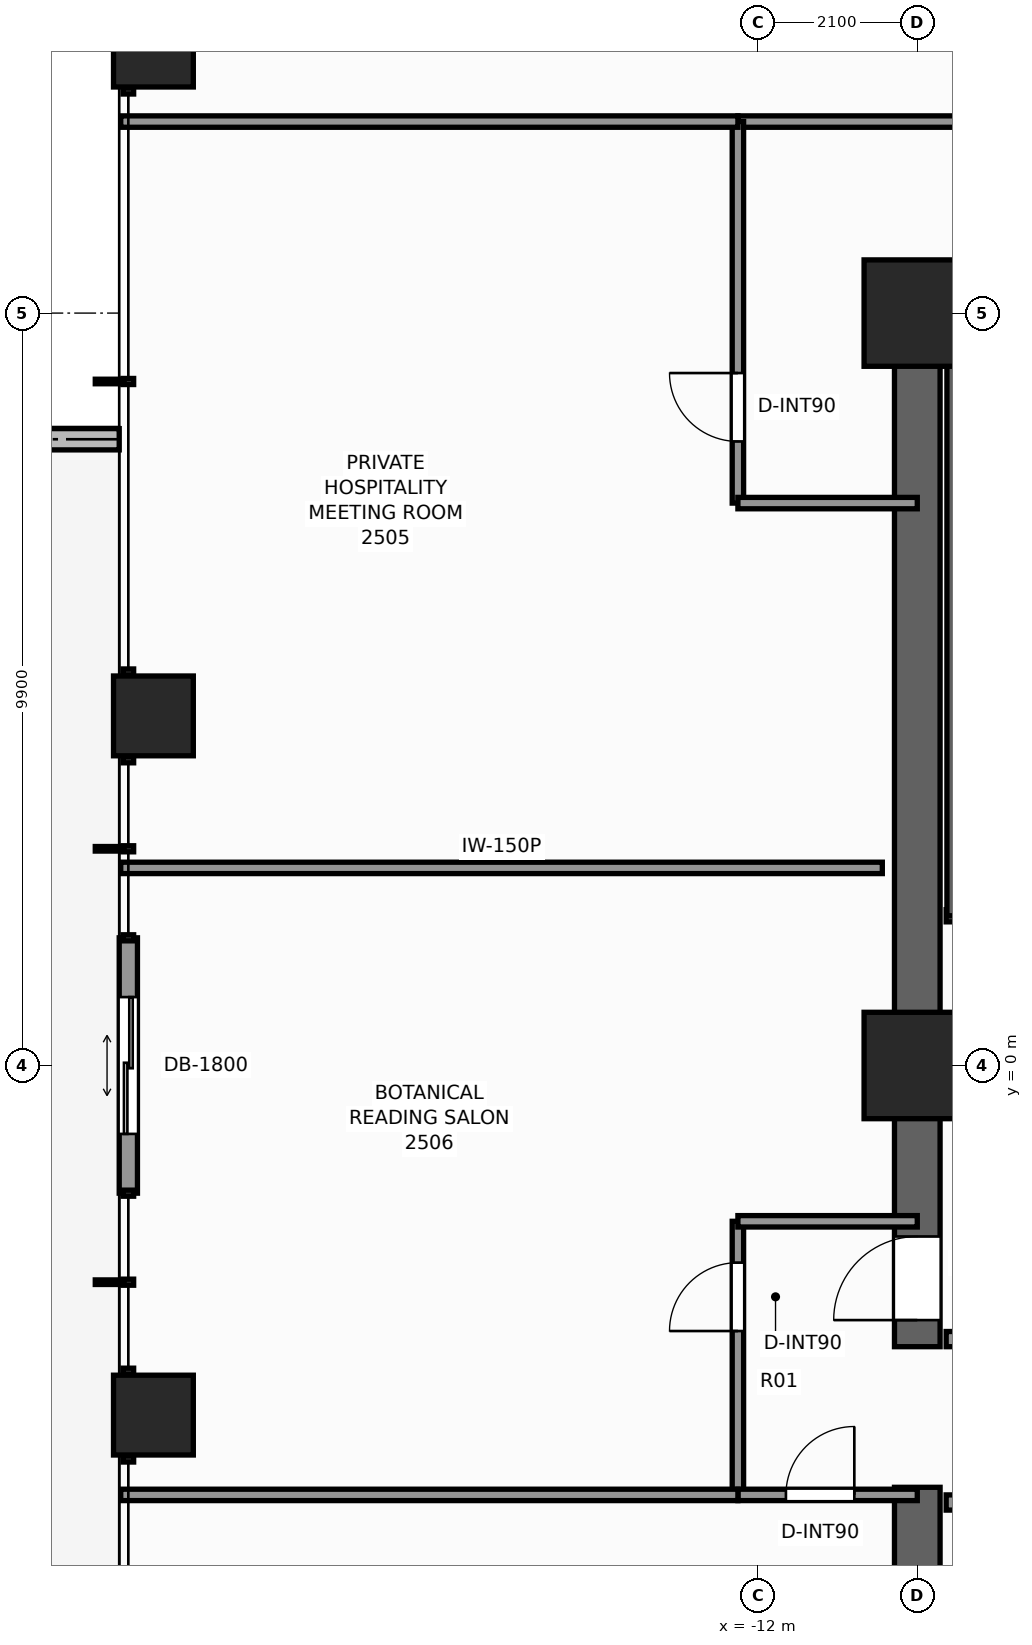
"""IFC4 building model, lengths in metres.
Left out: names, types, materials, properties, quantities, classifications, styles, units other than length and angle.
Written with IfcOpenShell. Run it as: python <this file> out.ifc"""

import sys

from ifc_helpers import new_model, si_unit, direction, frame, frame_2d, origin, origin_2d, place, context, subcontext, project, spatial, rectangle, extrude, element, fill, save


model = new_model("IFC4")
c1 = context("Model", 3, precision=1e-05, world=origin(), true_north=direction((0.0, 1.0)))
c2 = subcontext(c1, "Body", "Model", "MODEL_VIEW")
j1 = project(units=[si_unit("LENGTHUNIT", "METRE"), si_unit("PLANEANGLEUNIT", "RADIAN")], contexts=[c1])
p1 = place(None, origin())
s1 = spatial("IfcSite", under=j1, at=p1, CompositionType="ELEMENT")
p2 = place(p1, origin())
s2 = spatial("IfcBuilding", under=s1, at=p2, CompositionType="ELEMENT")
p3 = place(p2, frame((0.0, 0.0, 88.7)))
s3 = spatial("IfcBuildingStorey", under=s2, at=p3, CompositionType="ELEMENT", Elevation=88.7)
p4 = place(p3, frame((-10.2, 9.9, 0.0), z_axis=(0.0, 0.0, 1.0), x_axis=(1.0, 0.0, 0.0)))
e1 = element("IfcWall", 1, at=p4, inside=s3, PredefinedType="SHEAR", context=c2, shape_type="SweptSolid", body=[
    extrude(rectangle(XDim=14.62, YDim=0.6, at=frame_2d((7.31, 0.0))), origin(), (0.0, 0.0, 1.0), 3.3),
])
p5 = place(p3, frame((-9.9, -9.6, 0.0), z_axis=(0.0, 0.0, 1.0), x_axis=(0.0, 1.0, 0.0)))
e2 = element("IfcWall", 2, at=p5, inside=s3, PredefinedType="SHEAR", context=c2, shape_type="SweptSolid", body=[
    extrude(rectangle(XDim=4.05, YDim=0.6, at=frame_2d((2.025, 0.0))), origin(), (0.0, 0.0, 1.0), 3.3),
])
p6 = place(p3, frame((-9.9, -3.7, 0.0), z_axis=(0.0, 0.0, 1.0), x_axis=(0.0, 1.0, 0.0)))
e3 = element("IfcWall", 3, at=p6, inside=s3, PredefinedType="SHEAR", context=c2, shape_type="SweptSolid", body=[
    extrude(rectangle(XDim=13.3, YDim=0.6, at=frame_2d((6.65, 0.0))), origin(), (0.0, 0.0, 1.0), 3.3),
])
p7 = place(p6, frame((0.35, 0.0, 0.0)))
e4 = element("IfcOpeningElement", 4, at=p7, cuts=e3, PredefinedType="OPENING", context=c2, shape_type="SweptSolid", body=[
    extrude(rectangle(XDim=1.1, YDim=2.2, at=frame_2d((0.55, 1.1))), frame((0.0, 0.31, 0.0), z_axis=(0.0, -1.0, 0.0), x_axis=(1.0, 0.0, 0.0)), (0.0, 0.0, 1.0), 0.62),
])
for number, where, z_axis, x_axis in (
    (5, (-9.9, 9.9, 0.0), (0.0, 0.0, 1.0), (1.0, 0.0, 0.0)),
    (6, (-9.9, 0.0, 0.0), (0.0, 0.0, 1.0), (1.0, 0.0, 0.0)),
):
    element("IfcColumn", number, at=place(p3, frame(where, z_axis=z_axis, x_axis=x_axis)), inside=s3, PredefinedType="COLUMN", context=c2, shape_type="SweptSolid", body=[
        extrude(rectangle(XDim=1.4, YDim=1.4, at=origin_2d()), origin(), (0.0, 0.0, 1.0), 3.3),
    ])
for number, where, z_axis, x_axis in (
    (7, (-19.95, -4.6, 0.0), (0.0, 0.0, 1.0), (1.0, 0.0, 0.0)),
    (8, (-19.95, 4.6, 0.0), (0.0, 0.0, 1.0), (1.0, 0.0, 0.0)),
    (9, (-19.95, 13.4, 0.0), (0.0, 0.0, 1.0), (1.0, 0.0, 0.0)),
):
    element("IfcColumn", number, at=place(p3, frame(where, z_axis=z_axis, x_axis=x_axis)), inside=s3, PredefinedType="COLUMN", context=c2, shape_type="SweptSolid", body=[
        extrude(rectangle(XDim=1.05, YDim=1.05, at=origin_2d()), origin(), (0.0, 0.0, 1.0), 3.3),
    ])
p8 = place(p3, frame((-20.4, 8.24, -0.04), z_axis=(0.0, 0.0, 1.0), x_axis=(-1.0, 0.0, 0.0)))
e10 = element("IfcWall", 10, at=p8, inside=s3, PredefinedType="PARAPET", context=c2, shape_type="SweptSolid", body=[
    extrude(rectangle(XDim=2.006, YDim=0.28, at=frame_2d((1.003, 0.0))), origin(), (0.0, 0.0, 1.0), 0.42),
])
p9 = place(p3, frame((-20.28, -1.68, 0.0), z_axis=(0.0, 0.0, 1.0), x_axis=(0.0, 1.0, 0.0)))
e11 = element("IfcWall", 11, at=p9, inside=s3, PredefinedType="STANDARD", context=c2, shape_type="SweptSolid", body=[
    extrude(rectangle(XDim=3.36, YDim=0.24, at=frame_2d((1.68, 0.0))), origin(), (0.0, 0.0, 1.0), 3.08),
])
p10 = place(p9, frame((0.78, 0.0, 0.0)))
e12 = element("IfcOpeningElement", 12, at=p10, cuts=e11, PredefinedType="OPENING", context=c2, shape_type="SweptSolid", body=[
    extrude(rectangle(XDim=1.8, YDim=2.2, at=frame_2d((0.9, 1.1))), frame((0.0, 0.13, 0.0), z_axis=(0.0, -1.0, 0.0), x_axis=(1.0, 0.0, 0.0)), (0.0, 0.0, 1.0), 0.26),
])
p11 = place(p3, frame((-9.52, 1.97, 0.0), z_axis=(0.0, 0.0, 1.0), x_axis=(1.0, 0.0, 0.0)))
e13 = element("IfcWall", 13, at=p11, inside=s3, PredefinedType="SHEAR", context=c2, shape_type="SweptSolid", body=[
    extrude(rectangle(XDim=3.52, YDim=0.16, at=frame_2d((1.76, 0.0))), origin(), (0.0, 0.0, 1.0), 3.3),
])
p12 = place(p11, frame((1.15, 0.0, 0.0)))
e14 = element("IfcOpeningElement", 14, at=p12, cuts=e13, PredefinedType="OPENING", context=c2, shape_type="SweptSolid", body=[
    extrude(rectangle(XDim=1.1, YDim=2.2, at=frame_2d((0.55, 1.1))), frame((0.0, 0.09, 0.0), z_axis=(0.0, -1.0, 0.0), x_axis=(1.0, 0.0, 0.0)), (0.0, 0.0, 1.0), 0.18),
])
p13 = place(p3, frame((-9.52, 9.53, 0.0), z_axis=(0.0, 0.0, 1.0), x_axis=(1.0, 0.0, 0.0)))
e15 = element("IfcWall", 15, at=p13, inside=s3, PredefinedType="SHEAR", context=c2, shape_type="SweptSolid", body=[
    extrude(rectangle(XDim=3.52, YDim=0.16, at=frame_2d((1.76, 0.0))), origin(), (0.0, 0.0, 1.0), 3.3),
])
p14 = place(p3, frame((-9.43, 1.97, 0.0), z_axis=(0.0, 0.0, 1.0), x_axis=(0.0, 1.0, 0.0)))
e16 = element("IfcWall", 16, at=p14, inside=s3, PredefinedType="SHEAR", context=c2, shape_type="SweptSolid", body=[
    extrude(rectangle(XDim=7.56, YDim=0.16, at=frame_2d((3.78, 0.0))), origin(), (0.0, 0.0, 1.0), 3.3),
])
p15 = place(p3, frame((-9.52, -3.6, 0.0), z_axis=(0.0, 0.0, 1.0), x_axis=(1.0, 0.0, 0.0)))
e17 = element("IfcWall", 17, at=p15, inside=s3, PredefinedType="SOLIDWALL", context=c2, shape_type="SweptSolid", body=[
    extrude(rectangle(XDim=3.77, YDim=0.2, at=frame_2d((1.885, 0.0))), origin(), (0.0, 0.0, 1.0), 3.08),
])
p16 = place(p15, frame((1.15, 0.0, 0.0)))
e18 = element("IfcOpeningElement", 18, at=p16, cuts=e17, PredefinedType="OPENING", context=c2, shape_type="SweptSolid", body=[
    extrude(rectangle(XDim=0.95, YDim=2.06, at=frame_2d((0.475, 1.03))), frame((0.0, 0.11, 0.0), z_axis=(0.0, -1.0, 0.0), x_axis=(1.0, 0.0, 0.0)), (0.0, 0.0, 1.0), 0.22),
])
p17 = place(p3, frame((-9.52, -5.75, 0.0), z_axis=(0.0, 0.0, 1.0), x_axis=(1.0, 0.0, 0.0)))
e19 = element("IfcWall", 19, at=p17, inside=s3, PredefinedType="SOLIDWALL", context=c2, shape_type="SweptSolid", body=[
    extrude(rectangle(XDim=5.66, YDim=0.2, at=frame_2d((2.83, 0.0))), origin(), (0.0, 0.0, 1.0), 3.08),
])
p18 = place(p17, frame((0.55, 0.0, 0.0)))
e20 = element("IfcOpeningElement", 20, at=p18, cuts=e19, PredefinedType="OPENING", context=c2, shape_type="SweptSolid", body=[
    extrude(rectangle(XDim=1.1, YDim=2.2, at=frame_2d((0.55, 1.1))), frame((0.0, 0.11, 0.0), z_axis=(0.0, -1.0, 0.0), x_axis=(1.0, 0.0, 0.0)), (0.0, 0.0, 1.0), 0.22),
])
p19 = place(p17, frame((2.48, 0.0, 0.0)))
e21 = element("IfcOpeningElement", 21, at=p19, cuts=e19, PredefinedType="OPENING", context=c2, shape_type="SweptSolid", body=[
    extrude(rectangle(XDim=1.1, YDim=2.2, at=frame_2d((0.55, 1.1))), frame((0.0, 0.11, 0.0), z_axis=(0.0, -1.0, 0.0), x_axis=(1.0, 0.0, 0.0)), (0.0, 0.0, 1.0), 0.22),
])
p20 = place(p17, frame((4.41, 0.0, 0.0)))
e22 = element("IfcOpeningElement", 22, at=p20, cuts=e19, PredefinedType="OPENING", context=c2, shape_type="SweptSolid", body=[
    extrude(rectangle(XDim=1.1, YDim=2.2, at=frame_2d((0.55, 1.1))), frame((0.0, 0.11, 0.0), z_axis=(0.0, -1.0, 0.0), x_axis=(1.0, 0.0, 0.0)), (0.0, 0.0, 1.0), 0.22),
])
p21 = place(p3, frame((-12.26, 12.42, 0.0), z_axis=(0.0, 0.0, 1.0), x_axis=(1.0, 0.0, 0.0)))
e23 = element("IfcWall", 23, at=p21, inside=s3, PredefinedType="PARTITIONING", context=c2, shape_type="SweptSolid", body=[
    extrude(rectangle(XDim=24.68, YDim=0.15, at=frame_2d((12.34, 0.0))), origin(), (0.0, 0.0, 1.0), 2.292),
])
p22 = place(p21, frame((4.275, 0.0, 0.0)))
e24 = element("IfcOpeningElement", 24, at=p22, cuts=e23, PredefinedType="OPENING", context=c2, shape_type="SweptSolid", body=[
    extrude(rectangle(XDim=0.9, YDim=2.06, at=frame_2d((0.45, 1.03))), frame((0.0, 0.085, 0.0), z_axis=(0.0, -1.0, 0.0), x_axis=(1.0, 0.0, 0.0)), (0.0, 0.0, 1.0), 0.17),
])
p23 = place(p21, frame((19.345, 0.0, 0.0)))
e25 = element("IfcOpeningElement", 25, at=p23, cuts=e23, PredefinedType="OPENING", context=c2, shape_type="SweptSolid", body=[
    extrude(rectangle(XDim=0.9, YDim=2.06, at=frame_2d((0.45, 1.03))), frame((0.0, 0.085, 0.0), z_axis=(0.0, -1.0, 0.0), x_axis=(1.0, 0.0, 0.0)), (0.0, 0.0, 1.0), 0.17),
])
p24 = place(p3, frame((-12.26, 7.4, 0.0), z_axis=(0.0, 0.0, 1.0), x_axis=(0.0, 1.0, 0.0)))
e26 = element("IfcWall", 26, at=p24, inside=s3, PredefinedType="PARTITIONING", context=c2, shape_type="SweptSolid", body=[
    extrude(rectangle(XDim=5.02, YDim=0.15, at=frame_2d((2.51, 0.0))), origin(), (0.0, 0.0, 1.0), 2.292),
])
p25 = place(p24, frame((0.811, 0.0, 0.0)))
e27 = element("IfcOpeningElement", 27, at=p25, cuts=e26, PredefinedType="OPENING", context=c2, shape_type="SweptSolid", body=[
    extrude(rectangle(XDim=0.9, YDim=2.06, at=frame_2d((0.45, 1.03))), frame((0.0, 0.085, 0.0), z_axis=(0.0, -1.0, 0.0), x_axis=(1.0, 0.0, 0.0)), (0.0, 0.0, 1.0), 0.17),
])
p26 = place(p3, frame((-12.26, 7.4, 0.0), z_axis=(0.0, 0.0, 1.0), x_axis=(1.0, 0.0, 0.0)))
e28 = element("IfcWall", 28, at=p26, inside=s3, PredefinedType="PARTITIONING", context=c2, shape_type="SweptSolid", body=[
    extrude(rectangle(XDim=2.36, YDim=0.15, at=frame_2d((1.18, 0.0))), origin(), (0.0, 0.0, 1.0), 3.08),
])
p27 = place(p3, frame((-12.26, -5.65, 0.0), z_axis=(0.0, 0.0, 1.0), x_axis=(0.0, 1.0, 0.0)))
e29 = element("IfcWall", 29, at=p27, inside=s3, PredefinedType="PARTITIONING", context=c2, shape_type="SweptSolid", body=[
    extrude(rectangle(XDim=3.6, YDim=0.15, at=frame_2d((1.8, 0.0))), origin(), (0.0, 0.0, 1.0), 2.292),
])
p28 = place(p27, frame((2.156, 0.0, 0.0)))
e30 = element("IfcOpeningElement", 30, at=p28, cuts=e29, PredefinedType="OPENING", context=c2, shape_type="SweptSolid", body=[
    extrude(rectangle(XDim=0.9, YDim=2.06, at=frame_2d((0.45, 1.03))), frame((0.0, 0.085, 0.0), z_axis=(0.0, -1.0, 0.0), x_axis=(1.0, 0.0, 0.0)), (0.0, 0.0, 1.0), 0.17),
])
p29 = place(p3, frame((-12.26, -2.05, 0.0), z_axis=(0.0, 0.0, 1.0), x_axis=(1.0, 0.0, 0.0)))
e31 = element("IfcWall", 31, at=p29, inside=s3, PredefinedType="PARTITIONING", context=c2, shape_type="SweptSolid", body=[
    extrude(rectangle(XDim=2.36, YDim=0.15, at=frame_2d((1.18, 0.0))), origin(), (0.0, 0.0, 1.0), 3.08),
])
p30 = place(p3, frame((-12.26, -5.65, 0.0), z_axis=(0.0, 0.0, 1.0), x_axis=(1.0, 0.0, 0.0)))
e32 = element("IfcWall", 32, at=p30, inside=s3, PredefinedType="PARTITIONING", context=c2, shape_type="SweptSolid", body=[
    extrude(rectangle(XDim=2.36, YDim=0.15, at=frame_2d((1.18, 0.0))), origin(), (0.0, 0.0, 1.0), 3.08),
])
p31 = place(p30, frame((0.632, 0.0, 0.0)))
e33 = element("IfcOpeningElement", 33, at=p31, cuts=e32, PredefinedType="OPENING", context=c2, shape_type="SweptSolid", body=[
    extrude(rectangle(XDim=0.9, YDim=2.06, at=frame_2d((0.45, 1.03))), frame((0.0, 0.085, 0.0), z_axis=(0.0, -1.0, 0.0), x_axis=(1.0, 0.0, 0.0)), (0.0, 0.0, 1.0), 0.17),
])
p32 = place(p3, frame((-20.38, 12.42, 0.0), z_axis=(0.0, 0.0, 1.0), x_axis=(1.0, 0.0, 0.0)))
e34 = element("IfcWall", 34, at=p32, inside=s3, PredefinedType="PARTITIONING", context=c2, shape_type="SweptSolid", body=[
    extrude(rectangle(XDim=8.12, YDim=0.15, at=frame_2d((4.06, 0.0))), origin(), (0.0, 0.0, 1.0), 2.292),
])
p33 = place(p3, frame((-20.38, 2.6, 0.0), z_axis=(0.0, 0.0, 1.0), x_axis=(1.0, 0.0, 0.0)))
e35 = element("IfcWall", 35, at=p33, inside=s3, PredefinedType="PARTITIONING", context=c2, shape_type="SweptSolid", body=[
    extrude(rectangle(XDim=10.02, YDim=0.15, at=frame_2d((5.01, 0.0))), origin(), (0.0, 0.0, 1.0), 2.449),
])
p34 = place(p3, frame((-20.38, -5.65, 0.0), z_axis=(0.0, 0.0, 1.0), x_axis=(1.0, 0.0, 0.0)))
e36 = element("IfcWall", 36, at=p34, inside=s3, PredefinedType="PARTITIONING", context=c2, shape_type="SweptSolid", body=[
    extrude(rectangle(XDim=8.12, YDim=0.15, at=frame_2d((4.06, 0.0))), origin(), (0.0, 0.0, 1.0), 2.449),
])
p35 = place(p10, origin())
e37 = element("IfcDoor", 37, at=p35, inside=s3, OperationType="DOUBLE_DOOR_SLIDING", PredefinedType="DOOR", context=c2, shape_type="SweptSolid", body=[
    extrude(rectangle(XDim=1.8, YDim=2.2, at=frame_2d((0.9, 1.1))), frame((0.0, 0.025, 0.0), z_axis=(0.0, -1.0, 0.0), x_axis=(1.0, 0.0, 0.0)), (0.0, 0.0, 1.0), 0.05),
])
fill(e12, e37)
p36 = place(p7, origin())
e38 = element("IfcDoor", 38, at=p36, inside=s3, OperationType="SINGLE_SWING_LEFT", PredefinedType="DOOR", context=c2, shape_type="SweptSolid", body=[
    extrude(rectangle(XDim=1.1, YDim=2.2, at=frame_2d((0.55, 1.1))), frame((0.0, 0.025, 0.0), z_axis=(0.0, -1.0, 0.0), x_axis=(1.0, 0.0, 0.0)), (0.0, 0.0, 1.0), 0.05),
])
fill(e4, e38)
p37 = place(p25, origin())
e39 = element("IfcDoor", 39, at=p37, inside=s3, OperationType="SINGLE_SWING_RIGHT", PredefinedType="DOOR", context=c2, shape_type="SweptSolid", body=[
    extrude(rectangle(XDim=0.9, YDim=2.06, at=frame_2d((0.45, 1.03))), frame((0.0, 0.025, 0.0), z_axis=(0.0, -1.0, 0.0), x_axis=(1.0, 0.0, 0.0)), (0.0, 0.0, 1.0), 0.05),
])
fill(e27, e39)
p38 = place(p28, origin())
e40 = element("IfcDoor", 40, at=p38, inside=s3, OperationType="SINGLE_SWING_LEFT", PredefinedType="DOOR", context=c2, shape_type="SweptSolid", body=[
    extrude(rectangle(XDim=0.9, YDim=2.06, at=frame_2d((0.45, 1.03))), frame((0.0, 0.025, 0.0), z_axis=(0.0, -1.0, 0.0), x_axis=(1.0, 0.0, 0.0)), (0.0, 0.0, 1.0), 0.05),
])
fill(e30, e40)
p39 = place(p31, origin())
e41 = element("IfcDoor", 41, at=p39, inside=s3, OperationType="SINGLE_SWING_RIGHT", PredefinedType="DOOR", context=c2, shape_type="SweptSolid", body=[
    extrude(rectangle(XDim=0.9, YDim=2.06, at=frame_2d((0.45, 1.03))), frame((0.0, 0.025, 0.0), z_axis=(0.0, -1.0, 0.0), x_axis=(1.0, 0.0, 0.0)), (0.0, 0.0, 1.0), 0.05),
])
fill(e33, e41)
save(model, sys.argv[1])
